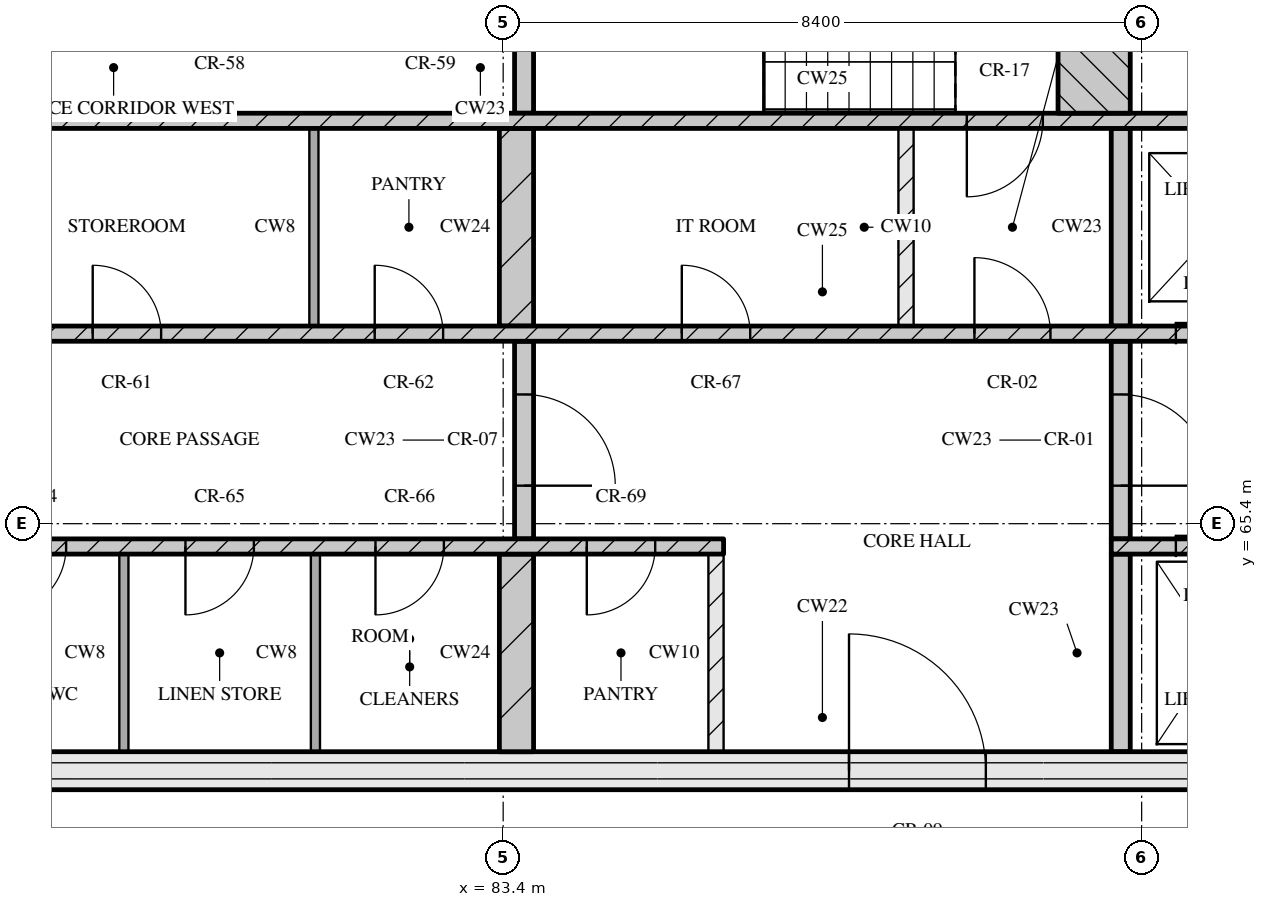
"""IFC4 building model, lengths in metres.
Left out: names, types, materials, properties, quantities, classifications, styles, units other than length and angle.
Written with IfcOpenShell. Run it as: python <this file> out.ifc"""

import sys

from ifc_helpers import new_model, si_unit, direction, frame, frame_2d, origin, place, context, subcontext, project, spatial, rectangle, extrude, element, fill, save


model = new_model("IFC4")
c1 = context("Model", 3, precision=1e-05, world=origin(), true_north=direction((0.0, 1.0)))
c2 = subcontext(c1, "Body", "Model", "MODEL_VIEW")
j1 = project(units=[si_unit("LENGTHUNIT", "METRE"), si_unit("PLANEANGLEUNIT", "RADIAN")], contexts=[c1])
p1 = place(None, origin())
s1 = spatial("IfcSite", under=j1, at=p1, CompositionType="ELEMENT")
p2 = place(p1, origin())
s2 = spatial("IfcBuilding", under=s1, at=p2, CompositionType="ELEMENT")
p3 = place(p2, frame((0.0, 0.0, 288.75)))
s3 = spatial("IfcBuildingStorey", under=s2, at=p3, CompositionType="ELEMENT", Elevation=288.75)
p4 = place(p3, frame((67.3, 62.15, 0.0), z_axis=(0.0, 0.0, 1.0), x_axis=(1.0, 0.0, 0.0)))
e1 = element("IfcWall", 1, at=p4, inside=s3, PredefinedType="SOLIDWALL", context=c2, shape_type="SweptSolid", body=[
    extrude(rectangle(XDim=40.6, YDim=0.5, at=frame_2d((20.3, 0.0))), origin(), (0.0, 0.0, 1.0), 3.32),
])
p5 = place(p4, frame((20.65, 0.0, 0.0)))
e2 = element("IfcOpeningElement", 2, at=p5, cuts=e1, PredefinedType="OPENING", context=c2, shape_type="SweptSolid", body=[
    extrude(rectangle(XDim=1.8, YDim=2.1, at=frame_2d((0.9, 1.05))), frame((0.0, 0.26, 0.0), z_axis=(0.0, -1.0, 0.0), x_axis=(1.0, 0.0, 0.0)), (0.0, 0.0, 1.0), 0.52),
])
for number, where, z_axis, x_axis in (
    (3, (78.41, 62.4, 0.0), (0.0, 0.0, 1.0), (0.0, 1.0, 0.0)),
    (4, (80.93, 62.4, 0.0), (0.0, 0.0, 1.0), (0.0, 1.0, 0.0)),
):
    element("IfcWall", number, at=place(p3, frame(where, z_axis=z_axis, x_axis=x_axis)), inside=s3, PredefinedType="PARTITIONING", context=c2, shape_type="SweptSolid", body=[
        extrude(rectangle(XDim=2.6, YDim=0.12, at=frame_2d((1.3, 0.0))), origin(), (0.0, 0.0, 1.0), 3.32),
    ])
p6 = place(p3, frame((83.575, 62.4, 0.0), z_axis=(0.0, 0.0, 1.0), x_axis=(0.0, 1.0, 0.0)))
e5 = element("IfcWall", 5, at=p6, inside=s3, PredefinedType="SOLIDWALL", context=c2, shape_type="SweptSolid", body=[
    extrude(rectangle(XDim=2.6, YDim=0.45, at=frame_2d((1.3, 0.0))), origin(), (0.0, 0.0, 1.0), 3.32),
])
p7 = place(p3, frame((86.2, 62.4, 0.0), z_axis=(0.0, 0.0, 1.0), x_axis=(0.0, 1.0, 0.0)))
e6 = element("IfcWall", 6, at=p7, inside=s3, PredefinedType="PARTITIONING", context=c2, shape_type="SweptSolid", body=[
    extrude(rectangle(XDim=2.6, YDim=0.2, at=frame_2d((1.3, 0.0))), origin(), (0.0, 0.0, 1.0), 3.32),
])
p8 = place(p3, frame((91.525, 62.4, 0.0), z_axis=(0.0, 0.0, 1.0), x_axis=(0.0, 1.0, 0.0)))
e7 = element("IfcWall", 7, at=p8, inside=s3, PredefinedType="SOLIDWALL", context=c2, shape_type="SweptSolid", body=[
    extrude(rectangle(XDim=2.6, YDim=0.25, at=frame_2d((1.3, 0.0))), origin(), (0.0, 0.0, 1.0), 3.32),
])
p9 = place(p3, frame((67.8, 65.1, 0.0), z_axis=(0.0, 0.0, 1.0), x_axis=(1.0, 0.0, 0.0)))
e8 = element("IfcWall", 8, at=p9, inside=s3, PredefinedType="SOLIDWALL", context=c2, shape_type="SweptSolid", body=[
    extrude(rectangle(XDim=18.5, YDim=0.2, at=frame_2d((9.25, 0.0))), origin(), (0.0, 0.0, 1.0), 3.32),
])
p10 = place(p9, frame((7.27, 0.0, 0.0)))
e9 = element("IfcOpeningElement", 9, at=p10, cuts=e8, PredefinedType="OPENING", context=c2, shape_type="SweptSolid", body=[
    extrude(rectangle(XDim=0.9, YDim=2.1, at=frame_2d((0.45, 1.05))), frame((0.0, 0.11, 0.0), z_axis=(0.0, -1.0, 0.0), x_axis=(1.0, 0.0, 0.0)), (0.0, 0.0, 1.0), 0.22),
])
p11 = place(p9, frame((8.95, 0.0, 0.0)))
e10 = element("IfcOpeningElement", 10, at=p11, cuts=e8, PredefinedType="OPENING", context=c2, shape_type="SweptSolid", body=[
    extrude(rectangle(XDim=0.9, YDim=2.1, at=frame_2d((0.45, 1.05))), frame((0.0, 0.11, 0.0), z_axis=(0.0, -1.0, 0.0), x_axis=(1.0, 0.0, 0.0)), (0.0, 0.0, 1.0), 0.22),
])
p12 = place(p9, frame((11.42, 0.0, 0.0)))
e11 = element("IfcOpeningElement", 11, at=p12, cuts=e8, PredefinedType="OPENING", context=c2, shape_type="SweptSolid", body=[
    extrude(rectangle(XDim=0.9, YDim=2.1, at=frame_2d((0.45, 1.05))), frame((0.0, 0.11, 0.0), z_axis=(0.0, -1.0, 0.0), x_axis=(1.0, 0.0, 0.0)), (0.0, 0.0, 1.0), 0.22),
])
p13 = place(p9, frame((13.92, 0.0, 0.0)))
e12 = element("IfcOpeningElement", 12, at=p13, cuts=e8, PredefinedType="OPENING", context=c2, shape_type="SweptSolid", body=[
    extrude(rectangle(XDim=0.9, YDim=2.1, at=frame_2d((0.45, 1.05))), frame((0.0, 0.11, 0.0), z_axis=(0.0, -1.0, 0.0), x_axis=(1.0, 0.0, 0.0)), (0.0, 0.0, 1.0), 0.22),
])
p14 = place(p9, frame((16.7, 0.0, 0.0)))
e13 = element("IfcOpeningElement", 13, at=p14, cuts=e8, PredefinedType="OPENING", context=c2, shape_type="SweptSolid", body=[
    extrude(rectangle(XDim=0.9, YDim=2.1, at=frame_2d((0.45, 1.05))), frame((0.0, 0.11, 0.0), z_axis=(0.0, -1.0, 0.0), x_axis=(1.0, 0.0, 0.0)), (0.0, 0.0, 1.0), 0.22),
])
p15 = place(p3, frame((91.4, 65.1, 0.0), z_axis=(0.0, 0.0, 1.0), x_axis=(1.0, 0.0, 0.0)))
e14 = element("IfcWall", 14, at=p15, inside=s3, PredefinedType="SOLIDWALL", context=c2, shape_type="SweptSolid", body=[
    extrude(rectangle(XDim=16.0, YDim=0.2, at=frame_2d((8.0, 0.0))), origin(), (0.0, 0.0, 1.0), 3.32),
])
p16 = place(p15, frame((0.85, 0.0, 0.0)))
e15 = element("IfcOpeningElement", 15, at=p16, cuts=e14, PredefinedType="OPENING", context=c2, shape_type="SweptSolid", body=[
    extrude(rectangle(XDim=1.1, YDim=2.1, at=frame_2d((0.55, 1.05))), frame((0.0, 0.11, 0.0), z_axis=(0.0, -1.0, 0.0), x_axis=(1.0, 0.0, 0.0)), (0.0, 0.0, 1.0), 0.22),
])
p17 = place(p15, frame((3.35, 0.0, 0.0)))
e16 = element("IfcOpeningElement", 16, at=p17, cuts=e14, PredefinedType="OPENING", context=c2, shape_type="SweptSolid", body=[
    extrude(rectangle(XDim=1.1, YDim=2.1, at=frame_2d((0.55, 1.05))), frame((0.0, 0.11, 0.0), z_axis=(0.0, -1.0, 0.0), x_axis=(1.0, 0.0, 0.0)), (0.0, 0.0, 1.0), 0.22),
])
p18 = place(p15, frame((5.85, 0.0, 0.0)))
e17 = element("IfcOpeningElement", 17, at=p18, cuts=e14, PredefinedType="OPENING", context=c2, shape_type="SweptSolid", body=[
    extrude(rectangle(XDim=1.1, YDim=2.1, at=frame_2d((0.55, 1.05))), frame((0.0, 0.11, 0.0), z_axis=(0.0, -1.0, 0.0), x_axis=(1.0, 0.0, 0.0)), (0.0, 0.0, 1.0), 0.22),
])
p19 = place(p15, frame((7.83, 0.0, 0.0)))
e18 = element("IfcOpeningElement", 18, at=p19, cuts=e14, PredefinedType="OPENING", context=c2, shape_type="SweptSolid", body=[
    extrude(rectangle(XDim=0.9, YDim=2.1, at=frame_2d((0.45, 1.05))), frame((0.0, 0.11, 0.0), z_axis=(0.0, -1.0, 0.0), x_axis=(1.0, 0.0, 0.0)), (0.0, 0.0, 1.0), 0.22),
])
p20 = place(p3, frame((83.675, 65.2, 0.0), z_axis=(0.0, 0.0, 1.0), x_axis=(0.0, 1.0, 0.0)))
e19 = element("IfcWall", 19, at=p20, inside=s3, PredefinedType="SOLIDWALL", context=c2, shape_type="SweptSolid", body=[
    extrude(rectangle(XDim=2.6, YDim=0.25, at=frame_2d((1.3, 0.0))), origin(), (0.0, 0.0, 1.0), 3.32),
])
p21 = place(p20, frame((0.7, 0.0, 0.0)))
e20 = element("IfcOpeningElement", 20, at=p21, cuts=e19, PredefinedType="OPENING", context=c2, shape_type="SweptSolid", body=[
    extrude(rectangle(XDim=1.2, YDim=2.1, at=frame_2d((0.6, 1.05))), frame((0.0, 0.135, 0.0), z_axis=(0.0, -1.0, 0.0), x_axis=(1.0, 0.0, 0.0)), (0.0, 0.0, 1.0), 0.27),
])
p22 = place(p3, frame((91.525, 65.2, 0.0), z_axis=(0.0, 0.0, 1.0), x_axis=(0.0, 1.0, 0.0)))
e21 = element("IfcWall", 21, at=p22, inside=s3, PredefinedType="SOLIDWALL", context=c2, shape_type="SweptSolid", body=[
    extrude(rectangle(XDim=2.6, YDim=0.25, at=frame_2d((1.3, 0.0))), origin(), (0.0, 0.0, 1.0), 3.32),
])
p23 = place(p22, frame((0.7, 0.0, 0.0)))
e22 = element("IfcOpeningElement", 22, at=p23, cuts=e21, PredefinedType="OPENING", context=c2, shape_type="SweptSolid", body=[
    extrude(rectangle(XDim=1.2, YDim=2.1, at=frame_2d((0.6, 1.05))), frame((0.0, 0.135, 0.0), z_axis=(0.0, -1.0, 0.0), x_axis=(1.0, 0.0, 0.0)), (0.0, 0.0, 1.0), 0.27),
])
p24 = place(p3, frame((76.05, 67.9, 0.0), z_axis=(0.0, 0.0, 1.0), x_axis=(1.0, 0.0, 0.0)))
e23 = element("IfcWall", 23, at=p24, inside=s3, PredefinedType="SOLIDWALL", context=c2, shape_type="SweptSolid", body=[
    extrude(rectangle(XDim=23.1, YDim=0.2, at=frame_2d((11.55, 0.0))), origin(), (0.0, 0.0, 1.0), 3.32),
])
p25 = place(p24, frame((1.95, 0.0, 0.0)))
e24 = element("IfcOpeningElement", 24, at=p25, cuts=e23, PredefinedType="OPENING", context=c2, shape_type="SweptSolid", body=[
    extrude(rectangle(XDim=0.9, YDim=2.1, at=frame_2d((0.45, 1.05))), frame((0.0, 0.11, 0.0), z_axis=(0.0, -1.0, 0.0), x_axis=(1.0, 0.0, 0.0)), (0.0, 0.0, 1.0), 0.22),
])
p26 = place(p24, frame((5.66, 0.0, 0.0)))
e25 = element("IfcOpeningElement", 25, at=p26, cuts=e23, PredefinedType="OPENING", context=c2, shape_type="SweptSolid", body=[
    extrude(rectangle(XDim=0.9, YDim=2.1, at=frame_2d((0.45, 1.05))), frame((0.0, 0.11, 0.0), z_axis=(0.0, -1.0, 0.0), x_axis=(1.0, 0.0, 0.0)), (0.0, 0.0, 1.0), 0.22),
])
p27 = place(p24, frame((9.7, 0.0, 0.0)))
e26 = element("IfcOpeningElement", 26, at=p27, cuts=e23, PredefinedType="OPENING", context=c2, shape_type="SweptSolid", body=[
    extrude(rectangle(XDim=0.9, YDim=2.1, at=frame_2d((0.45, 1.05))), frame((0.0, 0.11, 0.0), z_axis=(0.0, -1.0, 0.0), x_axis=(1.0, 0.0, 0.0)), (0.0, 0.0, 1.0), 0.22),
])
p28 = place(p24, frame((13.55, 0.0, 0.0)))
e27 = element("IfcOpeningElement", 27, at=p28, cuts=e23, PredefinedType="OPENING", context=c2, shape_type="SweptSolid", body=[
    extrude(rectangle(XDim=1.0, YDim=2.1, at=frame_2d((0.5, 1.05))), frame((0.0, 0.11, 0.0), z_axis=(0.0, -1.0, 0.0), x_axis=(1.0, 0.0, 0.0)), (0.0, 0.0, 1.0), 0.22),
])
p29 = place(p24, frame((16.2, 0.0, 0.0)))
e28 = element("IfcOpeningElement", 28, at=p29, cuts=e23, PredefinedType="OPENING", context=c2, shape_type="SweptSolid", body=[
    extrude(rectangle(XDim=1.1, YDim=2.1, at=frame_2d((0.55, 1.05))), frame((0.0, 0.11, 0.0), z_axis=(0.0, -1.0, 0.0), x_axis=(1.0, 0.0, 0.0)), (0.0, 0.0, 1.0), 0.22),
])
p30 = place(p24, frame((18.7, 0.0, 0.0)))
e29 = element("IfcOpeningElement", 29, at=p30, cuts=e23, PredefinedType="OPENING", context=c2, shape_type="SweptSolid", body=[
    extrude(rectangle(XDim=1.1, YDim=2.1, at=frame_2d((0.55, 1.05))), frame((0.0, 0.11, 0.0), z_axis=(0.0, -1.0, 0.0), x_axis=(1.0, 0.0, 0.0)), (0.0, 0.0, 1.0), 0.22),
])
p31 = place(p24, frame((21.2, 0.0, 0.0)))
e30 = element("IfcOpeningElement", 30, at=p31, cuts=e23, PredefinedType="OPENING", context=c2, shape_type="SweptSolid", body=[
    extrude(rectangle(XDim=1.1, YDim=2.1, at=frame_2d((0.55, 1.05))), frame((0.0, 0.11, 0.0), z_axis=(0.0, -1.0, 0.0), x_axis=(1.0, 0.0, 0.0)), (0.0, 0.0, 1.0), 0.22),
])
p32 = place(p3, frame((80.91, 68.0, 0.0), z_axis=(0.0, 0.0, 1.0), x_axis=(0.0, 1.0, 0.0)))
e31 = element("IfcWall", 31, at=p32, inside=s3, PredefinedType="PARTITIONING", context=c2, shape_type="SweptSolid", body=[
    extrude(rectangle(XDim=2.6, YDim=0.12, at=frame_2d((1.3, 0.0))), origin(), (0.0, 0.0, 1.0), 3.32),
])
p33 = place(p3, frame((83.575, 68.0, 0.0), z_axis=(0.0, 0.0, 1.0), x_axis=(0.0, 1.0, 0.0)))
e32 = element("IfcWall", 32, at=p33, inside=s3, PredefinedType="SOLIDWALL", context=c2, shape_type="SweptSolid", body=[
    extrude(rectangle(XDim=2.6, YDim=0.45, at=frame_2d((1.3, 0.0))), origin(), (0.0, 0.0, 1.0), 3.32),
])
p34 = place(p3, frame((88.7, 68.0, 0.0), z_axis=(0.0, 0.0, 1.0), x_axis=(0.0, 1.0, 0.0)))
e33 = element("IfcWall", 33, at=p34, inside=s3, PredefinedType="PARTITIONING", context=c2, shape_type="SweptSolid", body=[
    extrude(rectangle(XDim=2.6, YDim=0.2, at=frame_2d((1.3, 0.0))), origin(), (0.0, 0.0, 1.0), 3.32),
])
p35 = place(p3, frame((91.525, 68.0, 0.0), z_axis=(0.0, 0.0, 1.0), x_axis=(0.0, 1.0, 0.0)))
e34 = element("IfcWall", 34, at=p35, inside=s3, PredefinedType="SOLIDWALL", context=c2, shape_type="SweptSolid", body=[
    extrude(rectangle(XDim=2.6, YDim=0.25, at=frame_2d((1.3, 0.0))), origin(), (0.0, 0.0, 1.0), 3.32),
])
p36 = place(p3, frame((67.8, 70.7, 0.0), z_axis=(0.0, 0.0, 1.0), x_axis=(1.0, 0.0, 0.0)))
e35 = element("IfcWall", 35, at=p36, inside=s3, PredefinedType="SOLIDWALL", context=c2, shape_type="SweptSolid", body=[
    extrude(rectangle(XDim=39.6, YDim=0.2, at=frame_2d((19.8, 0.0))), origin(), (0.0, 0.0, 1.0), 3.32),
])
p37 = place(p36, frame((0.65, 0.0, 0.0)))
e36 = element("IfcOpeningElement", 36, at=p37, cuts=e35, PredefinedType="OPENING", context=c2, shape_type="SweptSolid", body=[
    extrude(rectangle(XDim=1.1, YDim=2.1, at=frame_2d((0.55, 1.05))), frame((0.0, 0.11, 0.0), z_axis=(0.0, -1.0, 0.0), x_axis=(1.0, 0.0, 0.0)), (0.0, 0.0, 1.0), 0.22),
])
p38 = place(p36, frame((3.25, 0.0, 0.0)))
e37 = element("IfcOpeningElement", 37, at=p38, cuts=e35, PredefinedType="OPENING", context=c2, shape_type="SweptSolid", body=[
    extrude(rectangle(XDim=1.1, YDim=2.1, at=frame_2d((0.55, 1.05))), frame((0.0, 0.11, 0.0), z_axis=(0.0, -1.0, 0.0), x_axis=(1.0, 0.0, 0.0)), (0.0, 0.0, 1.0), 0.22),
])
p39 = place(p36, frame((5.9, 0.0, 0.0)))
e38 = element("IfcOpeningElement", 38, at=p39, cuts=e35, PredefinedType="OPENING", context=c2, shape_type="SweptSolid", body=[
    extrude(rectangle(XDim=1.0, YDim=2.1, at=frame_2d((0.5, 1.05))), frame((0.0, 0.11, 0.0), z_axis=(0.0, -1.0, 0.0), x_axis=(1.0, 0.0, 0.0)), (0.0, 0.0, 1.0), 0.22),
])
p40 = place(p36, frame((21.7, 0.0, 0.0)))
e39 = element("IfcOpeningElement", 39, at=p40, cuts=e35, PredefinedType="OPENING", context=c2, shape_type="SweptSolid", body=[
    extrude(rectangle(XDim=1.0, YDim=2.1, at=frame_2d((0.5, 1.05))), frame((0.0, 0.11, 0.0), z_axis=(0.0, -1.0, 0.0), x_axis=(1.0, 0.0, 0.0)), (0.0, 0.0, 1.0), 0.22),
])
p41 = place(p36, frame((32.7, 0.0, 0.0)))
e40 = element("IfcOpeningElement", 40, at=p41, cuts=e35, PredefinedType="OPENING", context=c2, shape_type="SweptSolid", body=[
    extrude(rectangle(XDim=1.0, YDim=2.1, at=frame_2d((0.5, 1.05))), frame((0.0, 0.11, 0.0), z_axis=(0.0, -1.0, 0.0), x_axis=(1.0, 0.0, 0.0)), (0.0, 0.0, 1.0), 0.22),
])
p42 = place(p36, frame((35.25, 0.0, 0.0)))
e41 = element("IfcOpeningElement", 41, at=p42, cuts=e35, PredefinedType="OPENING", context=c2, shape_type="SweptSolid", body=[
    extrude(rectangle(XDim=1.1, YDim=2.1, at=frame_2d((0.55, 1.05))), frame((0.0, 0.11, 0.0), z_axis=(0.0, -1.0, 0.0), x_axis=(1.0, 0.0, 0.0)), (0.0, 0.0, 1.0), 0.22),
])
p43 = place(p36, frame((37.85, 0.0, 0.0)))
e42 = element("IfcOpeningElement", 42, at=p43, cuts=e35, PredefinedType="OPENING", context=c2, shape_type="SweptSolid", body=[
    extrude(rectangle(XDim=1.1, YDim=2.1, at=frame_2d((0.55, 1.05))), frame((0.0, 0.11, 0.0), z_axis=(0.0, -1.0, 0.0), x_axis=(1.0, 0.0, 0.0)), (0.0, 0.0, 1.0), 0.22),
])
p44 = place(p3, frame((83.675, 70.8, 0.0), z_axis=(0.0, 0.0, 1.0), x_axis=(0.0, 1.0, 0.0)))
e43 = element("IfcWall", 43, at=p44, inside=s3, PredefinedType="SOLIDWALL", context=c2, shape_type="SweptSolid", body=[
    extrude(rectangle(XDim=1.2, YDim=0.25, at=frame_2d((0.6, 0.0))), origin(), (0.0, 0.0, 1.0), 3.32),
])
p45 = place(p3, frame((91.175, 70.8, 0.0), z_axis=(0.0, 0.0, 1.0), x_axis=(0.0, 1.0, 0.0)))
e44 = element("IfcWall", 44, at=p45, inside=s3, PredefinedType="SOLIDWALL", context=c2, shape_type="SweptSolid", body=[
    extrude(rectangle(XDim=2.95, YDim=0.95, at=frame_2d((1.475, 0.0))), origin(), (0.0, 0.0, 1.0), 3.32),
])
p46 = place(p5, origin())
e45 = element("IfcDoor", 45, at=p46, inside=s3, OperationType="DOUBLE_DOOR_SINGLE_SWING", PredefinedType="DOOR", context=c2, shape_type="SweptSolid", body=[
    extrude(rectangle(XDim=1.8, YDim=2.1, at=frame_2d((0.9, 1.05))), frame((0.0, 0.025, 0.0), z_axis=(0.0, -1.0, 0.0), x_axis=(1.0, 0.0, 0.0)), (0.0, 0.0, 1.0), 0.05),
])
fill(e2, e45)
p47 = place(p11, origin())
e46 = element("IfcDoor", 46, at=p47, inside=s3, OperationType="SINGLE_SWING_RIGHT", PredefinedType="DOOR", context=c2, shape_type="SweptSolid", body=[
    extrude(rectangle(XDim=0.9, YDim=2.1, at=frame_2d((0.45, 1.05))), frame((0.0, 0.025, 0.0), z_axis=(0.0, -1.0, 0.0), x_axis=(1.0, 0.0, 0.0)), (0.0, 0.0, 1.0), 0.05),
])
fill(e10, e46)
p48 = place(p12, origin())
e47 = element("IfcDoor", 47, at=p48, inside=s3, OperationType="SINGLE_SWING_RIGHT", PredefinedType="DOOR", context=c2, shape_type="SweptSolid", body=[
    extrude(rectangle(XDim=0.9, YDim=2.1, at=frame_2d((0.45, 1.05))), frame((0.0, 0.025, 0.0), z_axis=(0.0, -1.0, 0.0), x_axis=(1.0, 0.0, 0.0)), (0.0, 0.0, 1.0), 0.05),
])
fill(e11, e47)
p49 = place(p13, origin())
e48 = element("IfcDoor", 48, at=p49, inside=s3, OperationType="SINGLE_SWING_RIGHT", PredefinedType="DOOR", context=c2, shape_type="SweptSolid", body=[
    extrude(rectangle(XDim=0.9, YDim=2.1, at=frame_2d((0.45, 1.05))), frame((0.0, 0.025, 0.0), z_axis=(0.0, -1.0, 0.0), x_axis=(1.0, 0.0, 0.0)), (0.0, 0.0, 1.0), 0.05),
])
fill(e12, e48)
p50 = place(p14, origin())
e49 = element("IfcDoor", 49, at=p50, inside=s3, OperationType="SINGLE_SWING_RIGHT", PredefinedType="DOOR", context=c2, shape_type="SweptSolid", body=[
    extrude(rectangle(XDim=0.9, YDim=2.1, at=frame_2d((0.45, 1.05))), frame((0.0, 0.025, 0.0), z_axis=(0.0, -1.0, 0.0), x_axis=(1.0, 0.0, 0.0)), (0.0, 0.0, 1.0), 0.05),
])
fill(e13, e49)
p51 = place(p16, origin())
e50 = element("IfcDoor", 50, at=p51, inside=s3, OperationType="SLIDING_TO_LEFT", PredefinedType="DOOR", context=c2, shape_type="SweptSolid", body=[
    extrude(rectangle(XDim=1.1, YDim=2.1, at=frame_2d((0.55, 1.05))), frame((0.0, 0.025, 0.0), z_axis=(0.0, -1.0, 0.0), x_axis=(1.0, 0.0, 0.0)), (0.0, 0.0, 1.0), 0.05),
])
fill(e15, e50)
p52 = place(p21, origin())
e51 = element("IfcDoor", 51, at=p52, inside=s3, OperationType="SINGLE_SWING_RIGHT", PredefinedType="DOOR", context=c2, shape_type="SweptSolid", body=[
    extrude(rectangle(XDim=1.2, YDim=2.1, at=frame_2d((0.6, 1.05))), frame((0.0, 0.025, 0.0), z_axis=(0.0, -1.0, 0.0), x_axis=(1.0, 0.0, 0.0)), (0.0, 0.0, 1.0), 0.05),
])
fill(e20, e51)
p53 = place(p23, origin())
e52 = element("IfcDoor", 52, at=p53, inside=s3, OperationType="SINGLE_SWING_RIGHT", PredefinedType="DOOR", context=c2, shape_type="SweptSolid", body=[
    extrude(rectangle(XDim=1.2, YDim=2.1, at=frame_2d((0.6, 1.05))), frame((0.0, 0.025, 0.0), z_axis=(0.0, -1.0, 0.0), x_axis=(1.0, 0.0, 0.0)), (0.0, 0.0, 1.0), 0.05),
])
fill(e22, e52)
p54 = place(p25, origin())
e53 = element("IfcDoor", 53, at=p54, inside=s3, OperationType="SINGLE_SWING_LEFT", PredefinedType="DOOR", context=c2, shape_type="SweptSolid", body=[
    extrude(rectangle(XDim=0.9, YDim=2.1, at=frame_2d((0.45, 1.05))), frame((0.0, 0.025, 0.0), z_axis=(0.0, -1.0, 0.0), x_axis=(1.0, 0.0, 0.0)), (0.0, 0.0, 1.0), 0.05),
])
fill(e24, e53)
p55 = place(p26, origin())
e54 = element("IfcDoor", 54, at=p55, inside=s3, OperationType="SINGLE_SWING_LEFT", PredefinedType="DOOR", context=c2, shape_type="SweptSolid", body=[
    extrude(rectangle(XDim=0.9, YDim=2.1, at=frame_2d((0.45, 1.05))), frame((0.0, 0.025, 0.0), z_axis=(0.0, -1.0, 0.0), x_axis=(1.0, 0.0, 0.0)), (0.0, 0.0, 1.0), 0.05),
])
fill(e25, e54)
p56 = place(p27, origin())
e55 = element("IfcDoor", 55, at=p56, inside=s3, OperationType="SINGLE_SWING_LEFT", PredefinedType="DOOR", context=c2, shape_type="SweptSolid", body=[
    extrude(rectangle(XDim=0.9, YDim=2.1, at=frame_2d((0.45, 1.05))), frame((0.0, 0.025, 0.0), z_axis=(0.0, -1.0, 0.0), x_axis=(1.0, 0.0, 0.0)), (0.0, 0.0, 1.0), 0.05),
])
fill(e26, e55)
p57 = place(p28, origin())
e56 = element("IfcDoor", 56, at=p57, inside=s3, OperationType="SINGLE_SWING_LEFT", PredefinedType="DOOR", context=c2, shape_type="SweptSolid", body=[
    extrude(rectangle(XDim=1.0, YDim=2.1, at=frame_2d((0.5, 1.05))), frame((0.0, 0.025, 0.0), z_axis=(0.0, -1.0, 0.0), x_axis=(1.0, 0.0, 0.0)), (0.0, 0.0, 1.0), 0.05),
])
fill(e27, e56)
p58 = place(p29, origin())
e57 = element("IfcDoor", 57, at=p58, inside=s3, OperationType="SLIDING_TO_RIGHT", PredefinedType="DOOR", context=c2, shape_type="SweptSolid", body=[
    extrude(rectangle(XDim=1.1, YDim=2.1, at=frame_2d((0.55, 1.05))), frame((0.0, 0.025, 0.0), z_axis=(0.0, -1.0, 0.0), x_axis=(1.0, 0.0, 0.0)), (0.0, 0.0, 1.0), 0.05),
])
fill(e28, e57)
p59 = place(p40, origin())
e58 = element("IfcDoor", 58, at=p59, inside=s3, OperationType="SINGLE_SWING_RIGHT", PredefinedType="DOOR", context=c2, shape_type="SweptSolid", body=[
    extrude(rectangle(XDim=1.0, YDim=2.1, at=frame_2d((0.5, 1.05))), frame((0.0, 0.025, 0.0), z_axis=(0.0, -1.0, 0.0), x_axis=(1.0, 0.0, 0.0)), (0.0, 0.0, 1.0), 0.05),
])
fill(e39, e58)
save(model, sys.argv[1])
